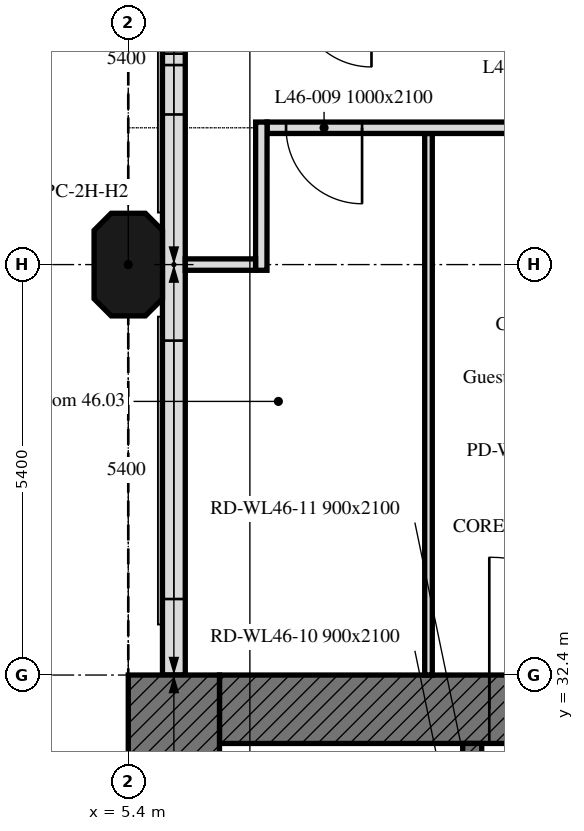
"""IFC4 building model, lengths in metres.
Left out: names, types, materials, properties, quantities, classifications, styles, units other than length and angle.
Written with IfcOpenShell. Run it as: python <this file> out.ifc"""

import sys

from ifc_helpers import new_model, si_unit, direction, frame, frame_2d, origin, place, context, subcontext, project, spatial, polyline, rectangle, outline, extrude, element, fill, save


model = new_model("IFC4")
c1 = context("Model", 3, precision=1e-05, world=origin(), true_north=direction((0.0, 1.0)))
c2 = subcontext(c1, "Body", "Model", "MODEL_VIEW")
j1 = project(units=[si_unit("LENGTHUNIT", "METRE"), si_unit("PLANEANGLEUNIT", "RADIAN")], contexts=[c1])
p1 = place(None, origin())
s1 = spatial("IfcSite", under=j1, at=p1, CompositionType="ELEMENT")
p2 = place(p1, origin())
s2 = spatial("IfcBuilding", under=s1, at=p2, CompositionType="ELEMENT")
p3 = place(p2, frame((0.0, 0.0, 190.6)))
s3 = spatial("IfcBuildingStorey", under=s2, at=p3, CompositionType="ELEMENT", Elevation=190.6)
p4 = place(p3, frame((5.4, 37.8, 0.0), z_axis=(0.0, 0.0, 1.0), x_axis=(0.0, 1.0, 0.0)))
e1 = element("IfcColumn", 1, at=p4, inside=s3, PredefinedType="COLUMN", context=c2, shape_type="SweptSolid", body=[
    extrude(outline(polyline([(-0.45, -0.45), (0.45, -0.45), (0.675, -0.225), (0.675, 0.225), (0.45, 0.45), (-0.45, 0.45), (-0.675, 0.225), (-0.675, -0.225), (-0.45, -0.45)])), origin(), (0.0, 0.0, 1.0), 3.0),
])
p5 = place(p3, frame((6.0, 43.014, 0.0), z_axis=(0.0, 0.0, 1.0), x_axis=(0.0, -1.0, 0.0)))
e2 = element("IfcWall", 2, at=p5, inside=s3, PredefinedType="SOLIDWALL", context=c2, shape_type="SweptSolid", body=[
    extrude(rectangle(XDim=10.614, YDim=0.3, at=frame_2d((5.307, 0.0))), origin(), (0.0, 0.0, 1.0), 3.0),
])
p6 = place(p5, frame((1.789, 0.0, 0.9)))
e3 = element("IfcOpeningElement", 3, at=p6, cuts=e2, PredefinedType="OPENING", context=c2, shape_type="SweptSolid", body=[
    extrude(rectangle(XDim=0.65, YDim=1.7, at=frame_2d((0.325, 0.85))), frame((0.0, 0.16, 0.0), z_axis=(0.0, -1.0, 0.0), x_axis=(1.0, 0.0, 0.0)), (0.0, 0.0, 1.0), 0.32),
])
p7 = place(p5, frame((2.589, 0.0, 0.9)))
e4 = element("IfcOpeningElement", 4, at=p7, cuts=e2, PredefinedType="OPENING", context=c2, shape_type="SweptSolid", body=[
    extrude(rectangle(XDim=0.65, YDim=1.7, at=frame_2d((0.325, 0.85))), frame((0.0, 0.16, 0.0), z_axis=(0.0, -1.0, 0.0), x_axis=(1.0, 0.0, 0.0)), (0.0, 0.0, 1.0), 0.32),
])
p8 = place(p5, frame((6.214, 0.0, 0.9)))
e5 = element("IfcOpeningElement", 5, at=p8, cuts=e2, PredefinedType="OPENING", context=c2, shape_type="SweptSolid", body=[
    extrude(rectangle(XDim=3.4, YDim=1.7, at=frame_2d((1.7, 0.85))), frame((0.0, 0.16, 0.0), z_axis=(0.0, -1.0, 0.0), x_axis=(1.0, 0.0, 0.0)), (0.0, 0.0, 1.0), 0.32),
])
p9 = place(p3, frame((6.6, 31.95, 0.0), z_axis=(0.0, 0.0, 1.0), x_axis=(1.0, 0.0, 0.0)))
e6 = element("IfcWall", 6, at=p9, inside=s3, PredefinedType="SOLIDWALL", context=c2, shape_type="SweptSolid", body=[
    extrude(rectangle(XDim=11.1, YDim=0.9, at=frame_2d((5.55, 0.0))), origin(), (0.0, 0.0, 1.0), 3.0),
])
p10 = place(p9, frame((3.55, 0.0, 0.0)))
e7 = element("IfcOpeningElement", 7, at=p10, cuts=e6, PredefinedType="OPENING", context=c2, shape_type="SweptSolid", body=[
    extrude(rectangle(XDim=2.0, YDim=2.4, at=frame_2d((1.0, 1.2))), frame((0.0, 0.45, 0.0), z_axis=(0.0, -1.0, 0.0), x_axis=(1.0, 0.0, 0.0)), (0.0, 0.0, 1.0), 0.9),
])
p11 = place(p3, frame((6.0, 16.2, 0.0), z_axis=(0.0, 0.0, 1.0), x_axis=(0.0, 1.0, 0.0)))
e8 = element("IfcWall", 8, at=p11, inside=s3, PredefinedType="SOLIDWALL", context=c2, shape_type="SweptSolid", body=[
    extrude(rectangle(XDim=16.2, YDim=1.2, at=frame_2d((8.1, 0.0))), origin(), (0.0, 0.0, 1.0), 3.0),
])
p12 = place(p3, frame((9.925, 17.1, 0.0), z_axis=(0.0, 0.0, 1.0), x_axis=(0.0, 1.0, 0.0)))
e9 = element("IfcWall", 9, at=p12, inside=s3, PredefinedType="SOLIDWALL", context=c2, shape_type="SweptSolid", body=[
    extrude(rectangle(XDim=14.4, YDim=0.25, at=frame_2d((7.2, 0.0))), origin(), (0.0, 0.0, 1.0), 3.0),
])
p13 = place(p12, frame((4.6, 0.0, 0.0)))
e10 = element("IfcOpeningElement", 10, at=p13, cuts=e9, PredefinedType="OPENING", context=c2, shape_type="SweptSolid", body=[
    extrude(rectangle(XDim=1.0, YDim=2.1, at=frame_2d((0.5, 1.05))), frame((0.0, 0.125, 0.0), z_axis=(0.0, -1.0, 0.0), x_axis=(1.0, 0.0, 0.0)), (0.0, 0.0, 1.0), 0.25),
])
p14 = place(p12, frame((7.062, 0.0, 0.0)))
e11 = element("IfcOpeningElement", 11, at=p14, cuts=e9, PredefinedType="OPENING", context=c2, shape_type="SweptSolid", body=[
    extrude(rectangle(XDim=1.2, YDim=2.1, at=frame_2d((0.6, 1.05))), frame((0.0, 0.125, 0.0), z_axis=(0.0, -1.0, 0.0), x_axis=(1.0, 0.0, 0.0)), (0.0, 0.0, 1.0), 0.25),
])
p15 = place(p12, frame((9.726, 0.0, 0.0)))
e12 = element("IfcOpeningElement", 12, at=p15, cuts=e9, PredefinedType="OPENING", context=c2, shape_type="SweptSolid", body=[
    extrude(rectangle(XDim=0.9, YDim=2.1, at=frame_2d((0.45, 1.05))), frame((0.0, 0.125, 0.0), z_axis=(0.0, -1.0, 0.0), x_axis=(1.0, 0.0, 0.0)), (0.0, 0.0, 1.0), 0.25),
])
p16 = place(p12, frame((11.539, 0.0, 0.0)))
e13 = element("IfcOpeningElement", 13, at=p16, cuts=e9, PredefinedType="OPENING", context=c2, shape_type="SweptSolid", body=[
    extrude(rectangle(XDim=0.9, YDim=2.1, at=frame_2d((0.45, 1.05))), frame((0.0, 0.125, 0.0), z_axis=(0.0, -1.0, 0.0), x_axis=(1.0, 0.0, 0.0)), (0.0, 0.0, 1.0), 0.25),
])
p17 = place(p12, frame((13.226, 0.0, 0.0)))
e14 = element("IfcOpeningElement", 14, at=p17, cuts=e9, PredefinedType="OPENING", context=c2, shape_type="SweptSolid", body=[
    extrude(rectangle(XDim=0.9, YDim=2.1, at=frame_2d((0.45, 1.05))), frame((0.0, 0.125, 0.0), z_axis=(0.0, -1.0, 0.0), x_axis=(1.0, 0.0, 0.0)), (0.0, 0.0, 1.0), 0.25),
])
p18 = place(p3, frame((9.35, 39.525, 0.0), z_axis=(0.0, 0.0, 1.0), x_axis=(0.0, -1.0, 0.0)))
e15 = element("IfcWall", 15, at=p18, inside=s3, PredefinedType="PARTITIONING", context=c2, shape_type="SweptSolid", body=[
    extrude(rectangle(XDim=7.125, YDim=0.1, at=frame_2d((3.562, 0.0))), origin(), (0.0, 0.0, 1.0), 3.0),
])
p19 = place(p3, frame((43.275, 39.6, 0.0), z_axis=(0.0, 0.0, 1.0), x_axis=(-1.0, 0.0, 0.0)))
e16 = element("IfcWall", 16, at=p19, inside=s3, PredefinedType="PARTITIONING", context=c2, shape_type="SweptSolid", body=[
    extrude(rectangle(XDim=36.049, YDim=0.15, at=frame_2d((18.024, 0.0))), origin(), (0.0, 0.0, 1.0), 2.4),
])
p20 = place(p19, frame((18.475, 0.0, 0.0)))
e17 = element("IfcOpeningElement", 17, at=p20, cuts=e16, PredefinedType="OPENING", context=c2, shape_type="SweptSolid", body=[
    extrude(rectangle(XDim=1.0, YDim=2.1, at=frame_2d((0.5, 1.05))), frame((0.0, 0.075, 0.0), z_axis=(0.0, -1.0, 0.0), x_axis=(1.0, 0.0, 0.0)), (0.0, 0.0, 1.0), 0.15),
])
p21 = place(p19, frame((34.799, 0.0, 0.0)))
e18 = element("IfcOpeningElement", 18, at=p21, cuts=e16, PredefinedType="OPENING", context=c2, shape_type="SweptSolid", body=[
    extrude(rectangle(XDim=1.0, YDim=2.1, at=frame_2d((0.5, 1.05))), frame((0.0, 0.075, 0.0), z_axis=(0.0, -1.0, 0.0), x_axis=(1.0, 0.0, 0.0)), (0.0, 0.0, 1.0), 0.15),
])
p22 = place(p19, frame((7.925, 0.0, 0.0)))
e19 = element("IfcOpeningElement", 19, at=p22, cuts=e16, PredefinedType="OPENING", context=c2, shape_type="SweptSolid", body=[
    extrude(rectangle(XDim=1.0, YDim=2.1, at=frame_2d((0.5, 1.05))), frame((0.0, 0.075, 0.0), z_axis=(0.0, -1.0, 0.0), x_axis=(1.0, 0.0, 0.0)), (0.0, 0.0, 1.0), 0.15),
])
p23 = place(p19, frame((29.025, 0.0, 0.0)))
e20 = element("IfcOpeningElement", 20, at=p23, cuts=e16, PredefinedType="OPENING", context=c2, shape_type="SweptSolid", body=[
    extrude(rectangle(XDim=1.0, YDim=2.1, at=frame_2d((0.5, 1.05))), frame((0.0, 0.075, 0.0), z_axis=(0.0, -1.0, 0.0), x_axis=(1.0, 0.0, 0.0)), (0.0, 0.0, 1.0), 0.15),
])
p24 = place(p19, frame((30.495, 0.0, 0.0)))
e21 = element("IfcOpeningElement", 21, at=p24, cuts=e16, PredefinedType="OPENING", context=c2, shape_type="SweptSolid", body=[
    extrude(rectangle(XDim=1.8, YDim=2.4, at=frame_2d((0.9, 1.2))), frame((0.0, 0.075, 0.0), z_axis=(0.0, -1.0, 0.0), x_axis=(1.0, 0.0, 0.0)), (0.0, 0.0, 1.0), 0.15),
])
p25 = place(p19, frame((5.925, 0.0, 0.0)))
e22 = element("IfcOpeningElement", 22, at=p25, cuts=e16, PredefinedType="OPENING", context=c2, shape_type="SweptSolid", body=[
    extrude(rectangle(XDim=1.0, YDim=2.1, at=frame_2d((0.5, 1.05))), frame((0.0, 0.075, 0.0), z_axis=(0.0, -1.0, 0.0), x_axis=(1.0, 0.0, 0.0)), (0.0, 0.0, 1.0), 0.15),
])
p26 = place(p3, frame((7.151, 39.675, 0.0), z_axis=(0.0, 0.0, 1.0), x_axis=(-0.00050081376, -0.999999874593, 0.0)))
e23 = element("IfcWall", 23, at=p26, inside=s3, PredefinedType="PARTITIONING", context=c2, shape_type="SweptSolid", body=[
    extrude(rectangle(XDim=1.95, YDim=0.15, at=frame_2d((0.975, 0.0))), origin(), (0.0, 0.0, 1.0), 3.0),
])
p27 = place(p3, frame((7.075, 37.8, 0.0), z_axis=(0.0, 0.0, 1.0), x_axis=(-1.0, 0.0, 0.0)))
e24 = element("IfcWall", 24, at=p27, inside=s3, PredefinedType="PARTITIONING", context=c2, shape_type="SweptSolid", body=[
    extrude(rectangle(XDim=0.925, YDim=0.15, at=frame_2d((0.462, 0.0))), origin(), (0.0, 0.0, 1.0), 3.0),
])
p28 = place(p6, origin())
e25 = element("IfcWindow", 25, at=p28, inside=s3, PartitioningType="SINGLE_PANEL", PredefinedType="WINDOW", context=c2, shape_type="SweptSolid", body=[
    extrude(rectangle(XDim=0.65, YDim=1.7, at=frame_2d((0.325, 0.85))), frame((0.0, 0.03, 0.0), z_axis=(0.0, -1.0, 0.0), x_axis=(1.0, 0.0, 0.0)), (0.0, 0.0, 1.0), 0.06),
])
fill(e3, e25)
p29 = place(p7, origin())
e26 = element("IfcWindow", 26, at=p29, inside=s3, PartitioningType="SINGLE_PANEL", PredefinedType="WINDOW", context=c2, shape_type="SweptSolid", body=[
    extrude(rectangle(XDim=0.65, YDim=1.7, at=frame_2d((0.325, 0.85))), frame((0.0, 0.03, 0.0), z_axis=(0.0, -1.0, 0.0), x_axis=(1.0, 0.0, 0.0)), (0.0, 0.0, 1.0), 0.06),
])
fill(e4, e26)
p30 = place(p8, origin())
e27 = element("IfcWindow", 27, at=p30, inside=s3, PartitioningType="SINGLE_PANEL", PredefinedType="WINDOW", context=c2, shape_type="SweptSolid", body=[
    extrude(rectangle(XDim=3.4, YDim=1.7, at=frame_2d((1.7, 0.85))), frame((0.0, 0.03, 0.0), z_axis=(0.0, -1.0, 0.0), x_axis=(1.0, 0.0, 0.0)), (0.0, 0.0, 1.0), 0.06),
])
fill(e5, e27)
p31 = place(p10, origin())
e28 = element("IfcDoor", 28, at=p31, inside=s3, OperationType="DOUBLE_DOOR_SINGLE_SWING", PredefinedType="DOOR", context=c2, shape_type="SweptSolid", body=[
    extrude(rectangle(XDim=2.0, YDim=2.4, at=frame_2d((1.0, 1.2))), frame((0.0, 0.025, 0.0), z_axis=(0.0, -1.0, 0.0), x_axis=(1.0, 0.0, 0.0)), (0.0, 0.0, 1.0), 0.05),
])
fill(e7, e28)
p32 = place(p21, origin())
e29 = element("IfcDoor", 29, at=p32, inside=s3, OperationType="SINGLE_SWING_LEFT", PredefinedType="DOOR", context=c2, shape_type="SweptSolid", body=[
    extrude(rectangle(XDim=1.0, YDim=2.1, at=frame_2d((0.5, 1.05))), frame((0.0, 0.025, 0.0), z_axis=(0.0, -1.0, 0.0), x_axis=(1.0, 0.0, 0.0)), (0.0, 0.0, 1.0), 0.05),
])
fill(e18, e29)
save(model, sys.argv[1])
